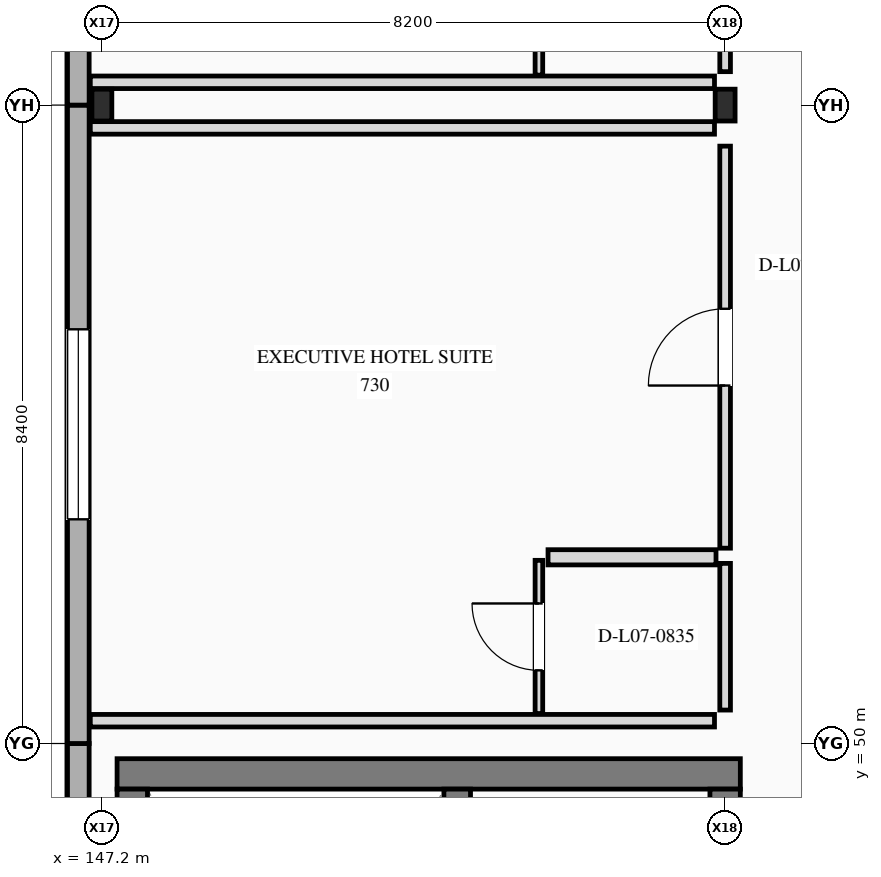
"""IFC4 building model, lengths in metres.
Left out: names, types, materials, properties, quantities, classifications, styles, units other than length and angle.
Written with IfcOpenShell. Run it as: python <this file> out.ifc"""

import sys

from ifc_helpers import new_model, si_unit, direction, frame, frame_2d, origin, origin_2d, place, context, subcontext, project, spatial, rectangle, i_section, extrude, element, fill, save


model = new_model("IFC4")
c1 = context("Model", 3, precision=1e-05, world=origin(), true_north=direction((0.0, 1.0)))
c2 = subcontext(c1, "Body", "Model", "MODEL_VIEW")
j1 = project(units=[si_unit("LENGTHUNIT", "METRE"), si_unit("PLANEANGLEUNIT", "RADIAN")], contexts=[c1])
p1 = place(None, origin())
s1 = spatial("IfcSite", under=j1, at=p1, CompositionType="ELEMENT")
p2 = place(p1, origin())
s2 = spatial("IfcBuilding", under=s1, at=p2, CompositionType="ELEMENT")
p3 = place(p2, frame((0.0, 0.0, 30.6)))
s3 = spatial("IfcBuildingStorey", under=s2, at=p3, CompositionType="ELEMENT", Elevation=30.6)
for number, where, z_axis, x_axis in (
    (1, (147.2, 58.4, 0.0), (0.0, 0.0, 1.0), (1.0, 0.0, 0.0)),
    (2, (155.4, 58.4, 0.0), (0.0, 0.0, 1.0), (1.0, 0.0, 0.0)),
):
    element("IfcColumn", number, at=place(p3, frame(where, z_axis=z_axis, x_axis=x_axis)), inside=s3, PredefinedType="COLUMN", context=c2, shape_type="SweptSolid", body=[
        extrude(i_section(OverallWidth=0.262, OverallDepth=0.419, WebThickness=0.012, FlangeThickness=0.019, at=origin_2d()), origin(), (0.0, 0.0, 1.0), 3.5),
    ])
p4 = place(p3, frame((146.89, 41.6, 0.0), z_axis=(0.0, 0.0, 1.0), x_axis=(0.0, 1.0, 0.0)))
e3 = element("IfcWall", 3, at=p4, inside=s3, PredefinedType="STANDARD", context=c2, shape_type="SweptSolid", body=[
    extrude(rectangle(XDim=8.4, YDim=0.285, at=frame_2d((4.2, 0.0))), origin(), (0.0, 0.0, 1.0), 3.5),
])
p5 = place(p3, frame((146.89, 50.0, 0.0), z_axis=(0.0, 0.0, 1.0), x_axis=(0.0, 1.0, 0.0)))
e4 = element("IfcWall", 4, at=p5, inside=s3, PredefinedType="STANDARD", context=c2, shape_type="SweptSolid", body=[
    extrude(rectangle(XDim=8.4, YDim=0.285, at=frame_2d((4.2, 0.0))), origin(), (0.0, 0.0, 1.0), 3.5),
])
p6 = place(p5, frame((2.95, 0.0, 0.85)))
e5 = element("IfcOpeningElement", 5, at=p6, cuts=e4, PredefinedType="OPENING", context=c2, shape_type="SweptSolid", body=[
    extrude(rectangle(XDim=2.5, YDim=1.75, at=frame_2d((1.25, 0.875))), frame((0.0, 0.152, 0.0), z_axis=(0.0, -1.0, 0.0), x_axis=(1.0, 0.0, 0.0)), (0.0, 0.0, 1.0), 0.305),
])
p7 = place(p3, frame((146.89, 58.4, 0.0), z_axis=(0.0, 0.0, 1.0), x_axis=(0.0, 1.0, 0.0)))
e6 = element("IfcWall", 6, at=p7, inside=s3, PredefinedType="STANDARD", context=c2, shape_type="SweptSolid", body=[
    extrude(rectangle(XDim=8.71, YDim=0.285, at=frame_2d((4.355, 0.0))), origin(), (0.0, 0.0, 1.0), 3.5),
])
p8 = place(p7, frame((3.35, 0.0, 0.85)))
e7 = element("IfcOpeningElement", 7, at=p8, cuts=e6, PredefinedType="OPENING", context=c2, shape_type="SweptSolid", body=[
    extrude(rectangle(XDim=1.7, YDim=1.6, at=frame_2d((0.85, 0.8))), frame((0.0, 0.152, 0.0), z_axis=(0.0, -1.0, 0.0), x_axis=(1.0, 0.0, 0.0)), (0.0, 0.0, 1.0), 0.305),
])
p9 = place(p3, frame((155.6, 49.6, 0.0), z_axis=(0.0, 0.0, 1.0), x_axis=(-1.0, 0.0, 0.0)))
e8 = element("IfcWall", 8, at=p9, inside=s3, PredefinedType="SHEAR", context=c2, shape_type="SweptSolid", body=[
    extrude(rectangle(XDim=8.2, YDim=0.4, at=frame_2d((4.1, 0.0))), origin(), (0.0, 0.0, 1.0), 3.5),
])
p10 = place(p3, frame((147.6, 49.4, 0.0), z_axis=(0.0, 0.0, 1.0), x_axis=(0.0, -1.0, 0.0)))
e9 = element("IfcWall", 9, at=p10, inside=s3, PredefinedType="SHEAR", context=c2, shape_type="SweptSolid", body=[
    extrude(rectangle(XDim=9.4, YDim=0.4, at=frame_2d((4.7, 0.0))), origin(), (0.0, 0.0, 1.0), 3.5),
])
p11 = place(p3, frame((155.4, 40.0, 0.0), z_axis=(0.0, 0.0, 1.0), x_axis=(0.0, 1.0, 0.0)))
e10 = element("IfcWall", 10, at=p11, inside=s3, PredefinedType="SHEAR", context=c2, shape_type="SweptSolid", body=[
    extrude(rectangle(XDim=9.4, YDim=0.4, at=frame_2d((4.7, 0.0))), origin(), (0.0, 0.0, 1.0), 3.5),
])
p12 = place(p11, frame((1.05, 0.0, 0.0)))
e11 = element("IfcOpeningElement", 11, at=p12, cuts=e10, PredefinedType="OPENING", context=c2, shape_type="SweptSolid", body=[
    extrude(rectangle(XDim=1.1, YDim=2.2, at=frame_2d((0.55, 1.1))), frame((0.0, 0.21, 0.0), z_axis=(0.0, -1.0, 0.0), x_axis=(1.0, 0.0, 0.0)), (0.0, 0.0, 1.0), 0.42),
])
p13 = place(p11, frame((3.95, 0.0, 0.0)))
e12 = element("IfcOpeningElement", 12, at=p13, cuts=e10, PredefinedType="OPENING", context=c2, shape_type="SweptSolid", body=[
    extrude(rectangle(XDim=1.1, YDim=2.2, at=frame_2d((0.55, 1.1))), frame((0.0, 0.21, 0.0), z_axis=(0.0, -1.0, 0.0), x_axis=(1.0, 0.0, 0.0)), (0.0, 0.0, 1.0), 0.42),
])
p14 = place(p11, frame((6.875, 0.0, 0.0)))
e13 = element("IfcOpeningElement", 13, at=p14, cuts=e10, PredefinedType="OPENING", context=c2, shape_type="SweptSolid", body=[
    extrude(rectangle(XDim=1.35, YDim=2.3, at=frame_2d((0.675, 1.15))), frame((0.0, 0.21, 0.0), z_axis=(0.0, -1.0, 0.0), x_axis=(1.0, 0.0, 0.0)), (0.0, 0.0, 1.0), 0.42),
])
p15 = place(p3, frame((151.875, 40.0, 0.0), z_axis=(0.0, 0.0, 1.0), x_axis=(0.0, 1.0, 0.0)))
e14 = element("IfcWall", 14, at=p15, inside=s3, PredefinedType="SHEAR", context=c2, shape_type="SweptSolid", body=[
    extrude(rectangle(XDim=9.4, YDim=0.35, at=frame_2d((4.7, 0.0))), origin(), (0.0, 0.0, 1.0), 3.5),
])
p16 = place(p3, frame((155.4, 50.44, 0.0), z_axis=(0.0, 0.0, 1.0), x_axis=(0.0, 1.0, 0.0)))
e15 = element("IfcWall", 15, at=p16, inside=s3, PredefinedType="PARTITIONING", context=c2, shape_type="SweptSolid", body=[
    extrude(rectangle(XDim=1.93, YDim=0.14, at=frame_2d((0.965, 0.0))), origin(), (0.0, 0.0, 1.0), 2.59),
])
p17 = place(p3, frame((155.4, 52.57, 0.0), z_axis=(0.0, 0.0, 1.0), x_axis=(0.0, 1.0, 0.0)))
e16 = element("IfcWall", 16, at=p17, inside=s3, PredefinedType="PARTITIONING", context=c2, shape_type="SweptSolid", body=[
    extrude(rectangle(XDim=5.29, YDim=0.14, at=frame_2d((2.645, 0.0))), origin(), (0.0, 0.0, 1.0), 2.59),
])
p18 = place(p17, frame((2.14, 0.0, 0.0)))
e17 = element("IfcOpeningElement", 17, at=p18, cuts=e16, PredefinedType="OPENING", context=c2, shape_type="SweptSolid", body=[
    extrude(rectangle(XDim=1.01, YDim=2.2, at=frame_2d((0.505, 1.1))), frame((0.0, 0.08, 0.0), z_axis=(0.0, -1.0, 0.0), x_axis=(1.0, 0.0, 0.0)), (0.0, 0.0, 1.0), 0.16),
])
p19 = place(p3, frame((147.048, 50.3, 0.0), z_axis=(0.0, 0.0, 1.0), x_axis=(1.0, 0.0, 0.0)))
e18 = element("IfcWall", 18, at=p19, inside=s3, PredefinedType="PARTITIONING", context=c2, shape_type="SweptSolid", body=[
    extrude(rectangle(XDim=8.212, YDim=0.165, at=frame_2d((4.106, 0.0))), origin(), (0.0, 0.0, 1.0), 3.2),
])
p20 = place(p3, frame((147.048, 58.1, 0.0), z_axis=(0.0, 0.0, 1.0), x_axis=(1.0, 0.0, 0.0)))
e19 = element("IfcWall", 19, at=p20, inside=s3, PredefinedType="PARTITIONING", context=c2, shape_type="SweptSolid", body=[
    extrude(rectangle(XDim=8.212, YDim=0.165, at=frame_2d((4.106, 0.0))), origin(), (0.0, 0.0, 1.0), 2.613),
])
p21 = place(p3, frame((153.07, 52.45, 0.0), z_axis=(0.0, 0.0, 1.0), x_axis=(1.0, 0.0, 0.0)))
e20 = element("IfcWall", 20, at=p21, inside=s3, PredefinedType="PLUMBINGWALL", context=c2, shape_type="SweptSolid", body=[
    extrude(rectangle(XDim=2.21, YDim=0.2, at=frame_2d((1.105, 0.0))), origin(), (0.0, 0.0, 1.0), 3.2),
])
p22 = place(p3, frame((152.95, 50.395, 0.0), z_axis=(0.0, 0.0, 1.0), x_axis=(0.0, 1.0, 0.0)))
e21 = element("IfcWall", 21, at=p22, inside=s3, PredefinedType="PARTITIONING", context=c2, shape_type="SweptSolid", body=[
    extrude(rectangle(XDim=2.015, YDim=0.1, at=frame_2d((1.008, 0.0))), origin(), (0.0, 0.0, 1.0), 3.2),
])
p23 = place(p22, frame((0.568, 0.0, 0.0)))
e22 = element("IfcOpeningElement", 22, at=p23, cuts=e21, PredefinedType="OPENING", context=c2, shape_type="SweptSolid", body=[
    extrude(rectangle(XDim=0.88, YDim=2.18, at=frame_2d((0.44, 1.09))), frame((0.0, 0.06, 0.0), z_axis=(0.0, -1.0, 0.0), x_axis=(1.0, 0.0, 0.0)), (0.0, 0.0, 1.0), 0.12),
])
p24 = place(p3, frame((155.4, 58.84, 0.0), z_axis=(0.0, 0.0, 1.0), x_axis=(0.0, 1.0, 0.0)))
e23 = element("IfcWall", 23, at=p24, inside=s3, PredefinedType="PARTITIONING", context=c2, shape_type="SweptSolid", body=[
    extrude(rectangle(XDim=1.93, YDim=0.14, at=frame_2d((0.965, 0.0))), origin(), (0.0, 0.0, 1.0), 2.674),
])
p25 = place(p3, frame((147.048, 58.7, 0.0), z_axis=(0.0, 0.0, 1.0), x_axis=(1.0, 0.0, 0.0)))
e24 = element("IfcWall", 24, at=p25, inside=s3, PredefinedType="PARTITIONING", context=c2, shape_type="SweptSolid", body=[
    extrude(rectangle(XDim=8.212, YDim=0.165, at=frame_2d((4.106, 0.0))), origin(), (0.0, 0.0, 1.0), 2.613),
])
p26 = place(p3, frame((152.95, 58.794, 0.0), z_axis=(0.0, 0.0, 1.0), x_axis=(0.0, 1.0, 0.0)))
e25 = element("IfcWall", 25, at=p26, inside=s3, PredefinedType="PARTITIONING", context=c2, shape_type="SweptSolid", body=[
    extrude(rectangle(XDim=2.016, YDim=0.1, at=frame_2d((1.008, 0.0))), origin(), (0.0, 0.0, 1.0), 2.808),
])
p27 = place(p26, frame((0.543, 0.0, 0.0)))
e26 = element("IfcOpeningElement", 26, at=p27, cuts=e25, PredefinedType="OPENING", context=c2, shape_type="SweptSolid", body=[
    extrude(rectangle(XDim=0.93, YDim=2.22, at=frame_2d((0.465, 1.11))), frame((0.0, 0.06, 0.0), z_axis=(0.0, -1.0, 0.0), x_axis=(1.0, 0.0, 0.0)), (0.0, 0.0, 1.0), 0.12),
])
p28 = place(p6, origin())
e27 = element("IfcWindow", 27, at=p28, inside=s3, PartitioningType="SINGLE_PANEL", PredefinedType="WINDOW", context=c2, shape_type="SweptSolid", body=[
    extrude(rectangle(XDim=2.5, YDim=1.75, at=frame_2d((1.25, 0.875))), frame((0.0, 0.03, 0.0), z_axis=(0.0, -1.0, 0.0), x_axis=(1.0, 0.0, 0.0)), (0.0, 0.0, 1.0), 0.06),
])
fill(e5, e27)
p29 = place(p18, origin())
e28 = element("IfcDoor", 28, at=p29, inside=s3, OperationType="SINGLE_SWING_LEFT", PredefinedType="DOOR", context=c2, shape_type="SweptSolid", body=[
    extrude(rectangle(XDim=1.01, YDim=2.2, at=frame_2d((0.505, 1.1))), frame((0.0, 0.025, 0.0), z_axis=(0.0, -1.0, 0.0), x_axis=(1.0, 0.0, 0.0)), (0.0, 0.0, 1.0), 0.05),
])
fill(e17, e28)
p30 = place(p23, origin())
e29 = element("IfcDoor", 29, at=p30, inside=s3, OperationType="SINGLE_SWING_RIGHT", PredefinedType="DOOR", context=c2, shape_type="SweptSolid", body=[
    extrude(rectangle(XDim=0.88, YDim=2.18, at=frame_2d((0.44, 1.09))), frame((0.0, 0.025, 0.0), z_axis=(0.0, -1.0, 0.0), x_axis=(1.0, 0.0, 0.0)), (0.0, 0.0, 1.0), 0.05),
])
fill(e22, e29)
save(model, sys.argv[1])
